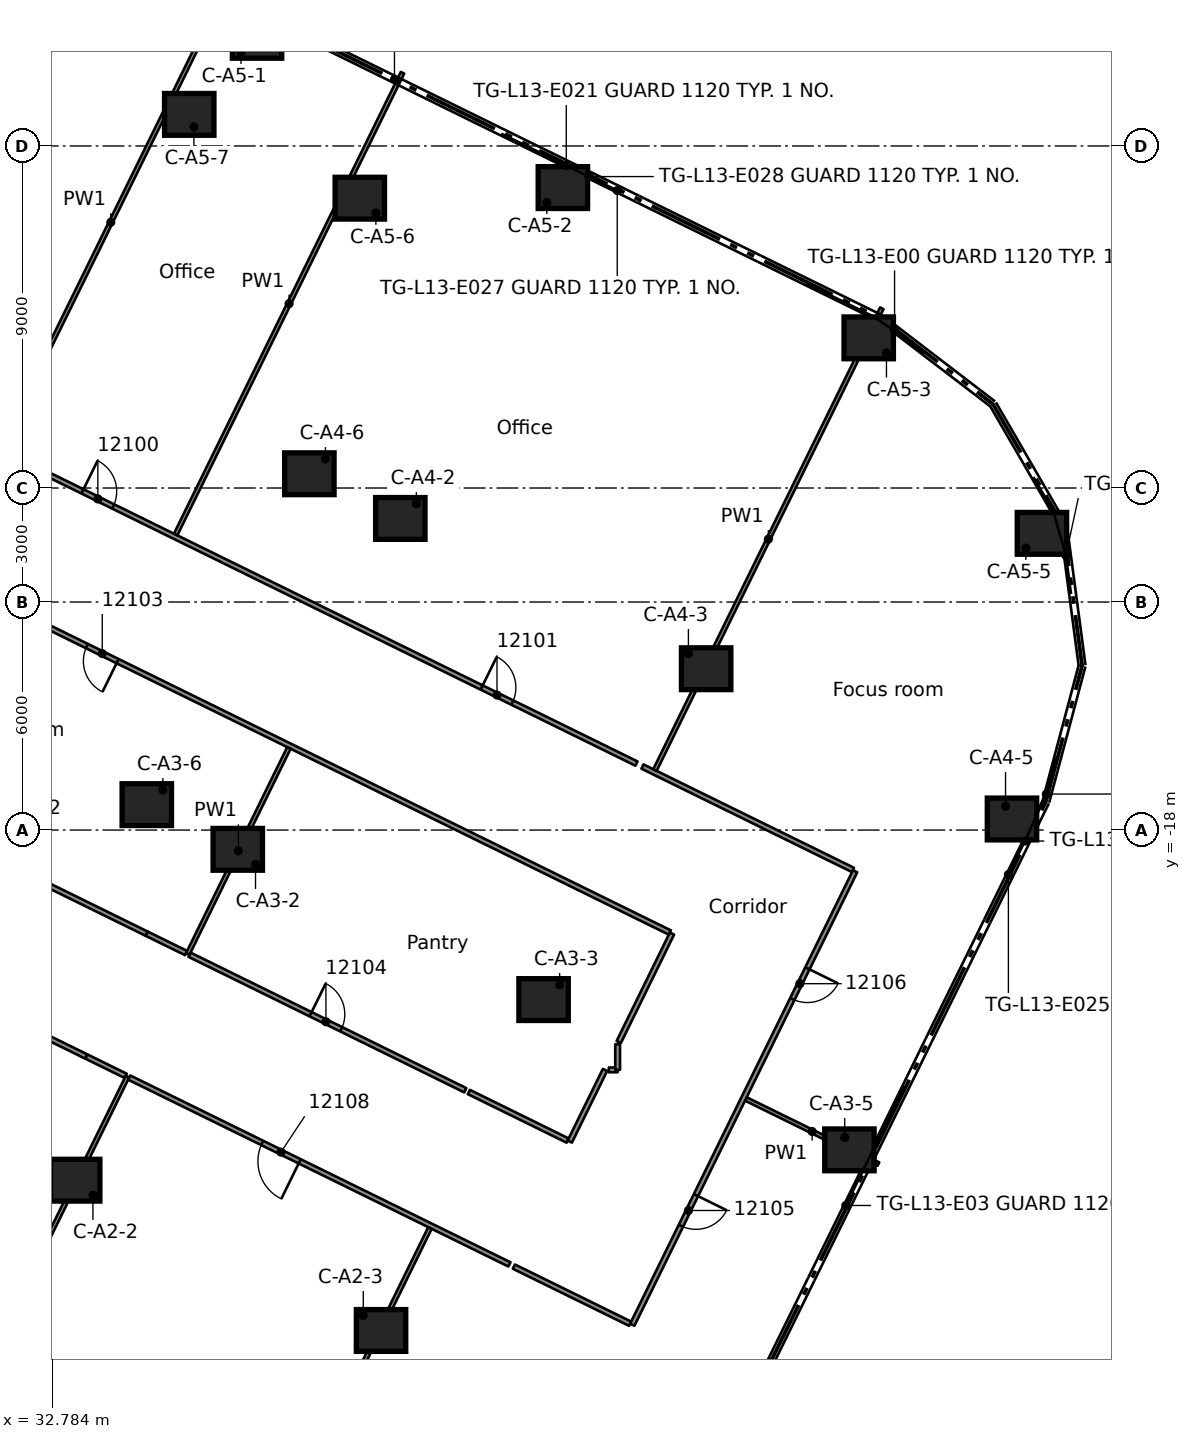
"""IFC4 building model, lengths in metres.
Left out: names, types, materials, properties, quantities, classifications, styles, units other than length and angle.
Written with IfcOpenShell. Run it as: python <this file> out.ifc"""

import sys

from ifc_helpers import new_model, si_unit, direction, frame, frame_2d, origin, origin_2d, place, context, subcontext, project, spatial, rectangle, extrude, element, fill, save


model = new_model("IFC4")
c1 = context("Model", 3, precision=1e-05, world=origin(), true_north=direction((0.0, 1.0)))
c2 = subcontext(c1, "Body", "Model", "MODEL_VIEW")
j1 = project(units=[si_unit("LENGTHUNIT", "METRE"), si_unit("PLANEANGLEUNIT", "RADIAN")], contexts=[c1])
p1 = place(None, origin())
s1 = spatial("IfcSite", under=j1, at=p1, CompositionType="ELEMENT")
p2 = place(p1, origin())
s2 = spatial("IfcBuilding", under=s1, at=p2, CompositionType="ELEMENT")
p3 = place(p2, frame((0.0, 0.0, 58.8)))
s3 = spatial("IfcBuildingStorey", under=s2, at=p3, CompositionType="ELEMENT", Elevation=58.8)
for number, where, z_axis, x_axis in (
    (1, (33.388, -27.213, 0.0), (0.0, 0.0, 1.0), (1.0, 0.0, 0.0)),
    (2, (41.436, -31.167, 0.0), (0.0, 0.0, 1.0), (1.0, 0.0, 0.0)),
    (3, (37.666, -18.507, 0.0), (0.0, 0.0, 1.0), (1.0, 0.0, 0.0)),
    (4, (45.713, -22.461, 0.0), (0.0, 0.0, 1.0), (1.0, 0.0, 0.0)),
    (5, (53.761, -26.415, 0.0), (0.0, 0.0, 1.0), (1.0, 0.0, 0.0)),
    (6, (35.272, -17.331, 0.0), (0.0, 0.0, 1.0), (1.0, 0.0, 0.0)),
    (7, (41.943, -9.801, 0.0), (0.0, 0.0, 1.0), (1.0, 0.0, 0.0)),
    (8, (49.991, -13.755, 0.0), (0.0, 0.0, 1.0), (1.0, 0.0, 0.0)),
    (9, (58.039, -17.709, 0.0), (0.0, 0.0, 1.0), (1.0, 0.0, 0.0)),
    (10, (39.55, -8.625, 0.0), (0.0, 0.0, 1.0), (1.0, 0.0, 0.0)),
    (11, (38.173, 2.859, 0.0), (0.0, 0.0, 1.0), (1.0, 0.0, 0.0)),
    (12, (46.221, -1.095, 0.0), (0.0, 0.0, 1.0), (1.0, 0.0, 0.0)),
    (13, (54.269, -5.049, 0.0), (0.0, 0.0, 1.0), (1.0, 0.0, 0.0)),
    (14, (58.827, -10.193, 0.0), (0.0, 0.0, 1.0), (1.0, 0.0, 0.0)),
    (15, (40.877, -1.374, 0.0), (0.0, 0.0, 1.0), (1.0, 0.0, 0.0)),
    (16, (36.389, 0.831, 0.0), (0.0, 0.0, 1.0), (1.0, 0.0, 0.0)),
):
    element("IfcColumn", number, at=place(p3, frame(where, z_axis=z_axis, x_axis=x_axis)), inside=s3, PredefinedType="COLUMN", context=c2, shape_type="SweptSolid", body=[
        extrude(rectangle(XDim=1.3, YDim=1.1, at=origin_2d()), origin(), (0.0, 0.0, 1.0), 3.5),
    ])
p4 = place(p3, frame((33.681, -23.959, 0.0), z_axis=(0.0, 0.0, 1.0), x_axis=(-0.897502075903, 0.44101023089, 0.0)))
e17 = element("IfcWall", 17, at=p4, inside=s3, PredefinedType="PARTITIONING", context=c2, shape_type="SweptSolid", body=[
    extrude(rectangle(XDim=9.052, YDim=0.125, at=frame_2d((4.526, 0.0))), origin(), (0.0, 0.0, 1.0), 3.08),
])
p5 = place(p4, frame((3.35, 0.0, 0.0)))
e18 = element("IfcOpeningElement", 18, at=p5, cuts=e17, PredefinedType="OPENING", context=c2, shape_type="SweptSolid", body=[
    extrude(rectangle(XDim=1.8, YDim=2.1, at=frame_2d((0.9, 1.05))), frame((0.0, 0.073, 0.0), z_axis=(0.0, -1.0, 0.0), x_axis=(1.0, 0.0, 0.0)), (0.0, 0.0, 1.0), 0.145),
])
p6 = place(p3, frame((44.815, -29.429, 0.0), z_axis=(0.0, 0.0, 1.0), x_axis=(-0.8975062817, 0.441001671549, 0.0)))
e19 = element("IfcWall", 19, at=p6, inside=s3, PredefinedType="PARTITIONING", context=c2, shape_type="SweptSolid", body=[
    extrude(rectangle(XDim=11.15, YDim=0.125, at=frame_2d((5.575, 0.0))), origin(), (0.0, 0.0, 1.0), 3.08),
])
p7 = place(p6, frame((6.149, 0.0, 0.0)))
e20 = element("IfcOpeningElement", 20, at=p7, cuts=e19, PredefinedType="OPENING", context=c2, shape_type="SweptSolid", body=[
    extrude(rectangle(XDim=1.1, YDim=2.1, at=frame_2d((0.55, 1.05))), frame((0.0, 0.073, 0.0), z_axis=(0.0, -1.0, 0.0), x_axis=(1.0, 0.0, 0.0)), (0.0, 0.0, 1.0), 0.145),
])
p8 = place(p3, frame((44.932, -29.487, 0.0), z_axis=(0.0, 0.0, 1.0), x_axis=(0.897586164131, -0.440839061291, 0.0)))
e21 = element("IfcWall", 21, at=p8, inside=s3, PredefinedType="PARTITIONING", context=c2, shape_type="SweptSolid", body=[
    extrude(rectangle(XDim=3.407, YDim=0.125, at=frame_2d((1.704, 0.0))), origin(), (0.0, 0.0, 1.0), 3.08),
])
p9 = place(p3, frame((27.304, -16.813, 0.0), z_axis=(0.0, 0.0, 1.0), x_axis=(0.897492436915, -0.441029846701, 0.0)))
e22 = element("IfcWall", 22, at=p9, inside=s3, PredefinedType="PARTITIONING", context=c2, shape_type="SweptSolid", body=[
    extrude(rectangle(XDim=8.875, YDim=0.125, at=frame_2d((4.438, 0.0))), origin(), (0.0, 0.0, 1.0), 3.08),
])
p10 = place(p9, frame((4.1, 0.0, 0.0)))
e23 = element("IfcOpeningElement", 23, at=p10, cuts=e22, PredefinedType="OPENING", context=c2, shape_type="SweptSolid", body=[
    extrude(rectangle(XDim=0.9, YDim=2.1, at=frame_2d((0.45, 1.05))), frame((0.0, 0.073, 0.0), z_axis=(0.0, -1.0, 0.0), x_axis=(1.0, 0.0, 0.0)), (0.0, 0.0, 1.0), 0.145),
])
p11 = place(p3, frame((36.396, -21.28, 0.0), z_axis=(0.0, 0.0, 1.0), x_axis=(0.897479279636, -0.441056620656, 0.0)))
e24 = element("IfcWall", 24, at=p11, inside=s3, PredefinedType="PARTITIONING", context=c2, shape_type="SweptSolid", body=[
    extrude(rectangle(XDim=8.087, YDim=0.125, at=frame_2d((4.043, 0.0))), origin(), (0.0, 0.0, 1.0), 3.08),
])
p12 = place(p11, frame((3.55, 0.0, 0.0)))
e25 = element("IfcOpeningElement", 25, at=p12, cuts=e24, PredefinedType="OPENING", context=c2, shape_type="SweptSolid", body=[
    extrude(rectangle(XDim=0.9, YDim=2.1, at=frame_2d((0.45, 1.05))), frame((0.0, 0.073, 0.0), z_axis=(0.0, -1.0, 0.0), x_axis=(1.0, 0.0, 0.0)), (0.0, 0.0, 1.0), 0.145),
])
p13 = place(p3, frame((43.747, -24.892, 0.0), z_axis=(0.0, 0.0, 1.0), x_axis=(0.897391556566, -0.441235078165, 0.0)))
e26 = element("IfcWall", 26, at=p13, inside=s3, PredefinedType="PARTITIONING", context=c2, shape_type="SweptSolid", body=[
    extrude(rectangle(XDim=2.896, YDim=0.125, at=frame_2d((1.448, 0.0))), origin(), (0.0, 0.0, 1.0), 3.08),
])
p14 = place(p3, frame((51.036, -25.076, 0.0), z_axis=(0.0, 0.0, 1.0), x_axis=(0.897583548385, -0.440844387136, 0.0)))
e27 = element("IfcWall", 27, at=p14, inside=s3, PredefinedType="PARTITIONING", context=c2, shape_type="SweptSolid", body=[
    extrude(rectangle(XDim=3.886, YDim=0.1, at=frame_2d((1.943, 0.0))), origin(), (0.0, 0.0, 1.0), 3.08),
])
p15 = place(p3, frame((49.036, -20.696, 0.0), z_axis=(0.0, 0.0, 1.0), x_axis=(-0.897509654304, 0.440994807715, 0.0)))
e28 = element("IfcWall", 28, at=p15, inside=s3, PredefinedType="PARTITIONING", context=c2, shape_type="SweptSolid", body=[
    extrude(rectangle(XDim=20.985, YDim=0.125, at=frame_2d((10.492, 0.0))), origin(), (0.0, 0.0, 1.0), 3.08),
])
p16 = place(p15, frame((16.192, 0.0, 0.0)))
e29 = element("IfcOpeningElement", 29, at=p16, cuts=e28, PredefinedType="OPENING", context=c2, shape_type="SweptSolid", body=[
    extrude(rectangle(XDim=0.9, YDim=2.1, at=frame_2d((0.45, 1.05))), frame((0.0, 0.073, 0.0), z_axis=(0.0, -1.0, 0.0), x_axis=(1.0, 0.0, 0.0)), (0.0, 0.0, 1.0), 0.145),
])
p17 = place(p3, frame((32.2, -8.411, 0.0), z_axis=(0.0, 0.0, 1.0), x_axis=(0.897530587373, -0.440952202318, 0.0)))
e30 = element("IfcWall", 30, at=p17, inside=s3, PredefinedType="PARTITIONING", context=c2, shape_type="SweptSolid", body=[
    extrude(rectangle(XDim=17.78, YDim=0.125, at=frame_2d((8.89, 0.0))), origin(), (0.0, 0.0, 1.0), 3.08),
])
p18 = place(p17, frame((1.538, 0.0, 0.0)))
e31 = element("IfcOpeningElement", 31, at=p18, cuts=e30, PredefinedType="OPENING", context=c2, shape_type="SweptSolid", body=[
    extrude(rectangle(XDim=0.9, YDim=2.1, at=frame_2d((0.45, 1.05))), frame((0.0, 0.073, 0.0), z_axis=(0.0, -1.0, 0.0), x_axis=(1.0, 0.0, 0.0)), (0.0, 0.0, 1.0), 0.145),
])
p19 = place(p17, frame((13.24, 0.0, 0.0)))
e32 = element("IfcOpeningElement", 32, at=p19, cuts=e30, PredefinedType="OPENING", context=c2, shape_type="SweptSolid", body=[
    extrude(rectangle(XDim=0.9, YDim=2.1, at=frame_2d((0.45, 1.05))), frame((0.0, 0.073, 0.0), z_axis=(0.0, -1.0, 0.0), x_axis=(1.0, 0.0, 0.0)), (0.0, 0.0, 1.0), 0.145),
])
p20 = place(p3, frame((53.854, -19.049, 0.0), z_axis=(0.0, 0.0, 1.0), x_axis=(-0.897616669458, 0.440776944395, 0.0)))
e33 = element("IfcWall", 33, at=p20, inside=s3, PredefinedType="PARTITIONING", context=c2, shape_type="SweptSolid", body=[
    extrude(rectangle(XDim=6.171, YDim=0.125, at=frame_2d((3.085, 0.0))), origin(), (0.0, 0.0, 1.0), 3.08),
])
p21 = place(p3, frame((33.681, -23.959, 0.0), z_axis=(0.0, 0.0, 1.0), x_axis=(0.897699526178, -0.440608171394, 0.0)))
e34 = element("IfcWall", 34, at=p21, inside=s3, PredefinedType="PARTITIONING", context=c2, shape_type="SweptSolid", body=[
    extrude(rectangle(XDim=1.155, YDim=0.125, at=frame_2d((0.578, 0.0))), origin(), (0.0, 0.0, 1.0), 3.08),
])
p22 = place(p3, frame((35.269, -20.727, 0.0), z_axis=(0.0, 0.0, 1.0), x_axis=(0.897658489219, -0.440691770667, 0.0)))
e35 = element("IfcWall", 35, at=p22, inside=s3, PredefinedType="PARTITIONING", context=c2, shape_type="SweptSolid", body=[
    extrude(rectangle(XDim=1.155, YDim=0.125, at=frame_2d((0.578, 0.0))), origin(), (0.0, 0.0, 1.0), 3.08),
])
p23 = place(p3, frame((47.43, -24.31, 0.0), z_axis=(0.0, 0.0, 1.0), x_axis=(1.0, 0.0, 0.0)))
e36 = element("IfcWall", 36, at=p23, inside=s3, PredefinedType="PARTITIONING", context=c2, shape_type="SweptSolid", body=[
    extrude(rectangle(XDim=0.232, YDim=0.125, at=frame_2d((0.116, 0.0))), origin(), (0.0, 0.0, 1.0), 3.08),
])
p24 = place(p3, frame((53.911, -19.084, 0.0), z_axis=(0.0, 0.0, 1.0), x_axis=(-0.441018582797, -0.897497971935, 0.0)))
e37 = element("IfcWall", 37, at=p24, inside=s3, PredefinedType="PARTITIONING", context=c2, shape_type="SweptSolid", body=[
    extrude(rectangle(XDim=13.296, YDim=0.125, at=frame_2d((6.648, 0.0))), origin(), (0.0, 0.0, 1.0), 3.08),
])
p25 = place(p24, frame((9.495, 0.0, 0.0)))
e38 = element("IfcOpeningElement", 38, at=p25, cuts=e37, PredefinedType="OPENING", context=c2, shape_type="SweptSolid", body=[
    extrude(rectangle(XDim=0.9, YDim=2.1, at=frame_2d((0.45, 1.05))), frame((0.0, 0.073, 0.0), z_axis=(0.0, -1.0, 0.0), x_axis=(1.0, 0.0, 0.0)), (0.0, 0.0, 1.0), 0.145),
])
p26 = place(p24, frame((2.846, 0.0, 0.0)))
e39 = element("IfcOpeningElement", 39, at=p26, cuts=e37, PredefinedType="OPENING", context=c2, shape_type="SweptSolid", body=[
    extrude(rectangle(XDim=0.9, YDim=2.1, at=frame_2d((0.45, 1.05))), frame((0.0, 0.073, 0.0), z_axis=(0.0, -1.0, 0.0), x_axis=(1.0, 0.0, 0.0)), (0.0, 0.0, 1.0), 0.145),
])
p27 = place(p3, frame((46.403, -26.197, 0.0), z_axis=(0.0, 0.0, 1.0), x_axis=(0.440925238095, 0.897543834256, 0.0)))
e40 = element("IfcWall", 40, at=p27, inside=s3, PredefinedType="PARTITIONING", context=c2, shape_type="SweptSolid", body=[
    extrude(rectangle(XDim=2.1, YDim=0.125, at=frame_2d((1.05, 0.0))), origin(), (0.0, 0.0, 1.0), 3.08),
])
p28 = place(p3, frame((47.691, -23.577, 0.0), z_axis=(0.0, 0.0, 1.0), x_axis=(0.440690066064, 0.897659326066, 0.0)))
e41 = element("IfcWall", 41, at=p28, inside=s3, PredefinedType="PARTITIONING", context=c2, shape_type="SweptSolid", body=[
    extrude(rectangle(XDim=3.179, YDim=0.125, at=frame_2d((1.59, 0.0))), origin(), (0.0, 0.0, 1.0), 3.08),
])
p29 = place(p3, frame((36.754, -40.62, 0.0), z_axis=(0.0, 0.0, 1.0), x_axis=(0.440962253121, 0.897525649395, 0.0)))
e42 = element("IfcWall", 42, at=p29, inside=s3, PredefinedType="PARTITIONING", context=c2, shape_type="SweptSolid", body=[
    extrude(rectangle(XDim=13.536, YDim=0.1, at=frame_2d((6.768, 0.0))), origin(), (0.0, 0.0, 1.0), 3.08),
])
p30 = place(p3, frame((48.644, -16.421, 0.0), z_axis=(0.0, 0.0, 1.0), x_axis=(0.440940839441, 0.897536169808, 0.0)))
e43 = element("IfcWall", 43, at=p30, inside=s3, PredefinedType="PARTITIONING", context=c2, shape_type="SweptSolid", body=[
    extrude(rectangle(XDim=13.537, YDim=0.1, at=frame_2d((6.769, 0.0))), origin(), (0.0, 0.0, 1.0), 3.08),
])
p31 = place(p3, frame((28.766, -36.695, 0.0), z_axis=(0.0, 0.0, 1.0), x_axis=(0.440983805809, 0.897515060049, 0.0)))
e44 = element("IfcWall", 44, at=p31, inside=s3, PredefinedType="PARTITIONING", context=c2, shape_type="SweptSolid", body=[
    extrude(rectangle(XDim=13.599, YDim=0.1, at=frame_2d((6.799, 0.0))), origin(), (0.0, 0.0, 1.0), 3.08),
])
p32 = place(p3, frame((36.351, -21.258, 0.0), z_axis=(0.0, 0.0, 1.0), x_axis=(0.440827848832, 0.897591670914, 0.0)))
e45 = element("IfcWall", 45, at=p32, inside=s3, PredefinedType="PARTITIONING", context=c2, shape_type="SweptSolid", body=[
    extrude(rectangle(XDim=6.036, YDim=0.1, at=frame_2d((3.018, 0.0))), origin(), (0.0, 0.0, 1.0), 3.08),
])
p33 = place(p3, frame((36.031, -10.223, 0.0), z_axis=(0.0, 0.0, 1.0), x_axis=(0.44102750491, 0.897493587672, 0.0)))
e46 = element("IfcWall", 46, at=p33, inside=s3, PredefinedType="PARTITIONING", context=c2, shape_type="SweptSolid", body=[
    extrude(rectangle(XDim=13.537, YDim=0.1, at=frame_2d((6.768, 0.0))), origin(), (0.0, 0.0, 1.0), 3.08),
])
p34 = place(p3, frame((31.275, -8.217, 0.0), z_axis=(0.0, 0.0, 1.0), x_axis=(0.440962245693, 0.897525653045, 0.0)))
e47 = element("IfcWall", 47, at=p34, inside=s3, PredefinedType="PARTITIONING", context=c2, shape_type="SweptSolid", body=[
    extrude(rectangle(XDim=13.833, YDim=0.1, at=frame_2d((6.917, 0.0))), origin(), (0.0, 0.0, 1.0), 3.08),
])
p35 = place(p3, frame((47.662, -24.31, 0.0), z_axis=(0.0, 0.0, 1.0), x_axis=(0.0, 1.0, 0.0)))
e48 = element("IfcWall", 48, at=p35, inside=s3, PredefinedType="PARTITIONING", context=c2, shape_type="SweptSolid", body=[
    extrude(rectangle(XDim=0.676, YDim=0.125, at=frame_2d((0.338, 0.0))), origin(), (0.0, 0.0, 1.0), 3.08),
])
p36 = place(p18, origin())
e49 = element("IfcDoor", 49, at=p36, inside=s3, OperationType="SINGLE_SWING_LEFT", PredefinedType="DOOR", context=c2, shape_type="SweptSolid", body=[
    extrude(rectangle(XDim=0.9, YDim=2.1, at=frame_2d((0.45, 1.05))), frame((0.0, 0.025, 0.0), z_axis=(0.0, -1.0, 0.0), x_axis=(1.0, 0.0, 0.0)), (0.0, 0.0, 1.0), 0.05),
])
fill(e31, e49)
p37 = place(p19, origin())
e50 = element("IfcDoor", 50, at=p37, inside=s3, OperationType="SINGLE_SWING_RIGHT", PredefinedType="DOOR", context=c2, shape_type="SweptSolid", body=[
    extrude(rectangle(XDim=0.9, YDim=2.1, at=frame_2d((0.45, 1.05))), frame((0.0, 0.025, 0.0), z_axis=(0.0, -1.0, 0.0), x_axis=(1.0, 0.0, 0.0)), (0.0, 0.0, 1.0), 0.05),
])
fill(e32, e50)
p38 = place(p16, origin())
e51 = element("IfcDoor", 51, at=p38, inside=s3, OperationType="SINGLE_SWING_RIGHT", PredefinedType="DOOR", context=c2, shape_type="SweptSolid", body=[
    extrude(rectangle(XDim=0.9, YDim=2.1, at=frame_2d((0.45, 1.05))), frame((0.0, 0.025, 0.0), z_axis=(0.0, -1.0, 0.0), x_axis=(1.0, 0.0, 0.0)), (0.0, 0.0, 1.0), 0.05),
])
fill(e29, e51)
p39 = place(p12, origin())
e52 = element("IfcDoor", 52, at=p39, inside=s3, OperationType="SINGLE_SWING_LEFT", PredefinedType="DOOR", context=c2, shape_type="SweptSolid", body=[
    extrude(rectangle(XDim=0.9, YDim=2.1, at=frame_2d((0.45, 1.05))), frame((0.0, 0.025, 0.0), z_axis=(0.0, -1.0, 0.0), x_axis=(1.0, 0.0, 0.0)), (0.0, 0.0, 1.0), 0.05),
])
fill(e25, e52)
p40 = place(p25, origin())
e53 = element("IfcDoor", 53, at=p40, inside=s3, OperationType="SINGLE_SWING_RIGHT", PredefinedType="DOOR", context=c2, shape_type="SweptSolid", body=[
    extrude(rectangle(XDim=0.9, YDim=2.1, at=frame_2d((0.45, 1.05))), frame((0.0, 0.025, 0.0), z_axis=(0.0, -1.0, 0.0), x_axis=(1.0, 0.0, 0.0)), (0.0, 0.0, 1.0), 0.05),
])
fill(e38, e53)
p41 = place(p26, origin())
e54 = element("IfcDoor", 54, at=p41, inside=s3, OperationType="SINGLE_SWING_LEFT", PredefinedType="DOOR", context=c2, shape_type="SweptSolid", body=[
    extrude(rectangle(XDim=0.9, YDim=2.1, at=frame_2d((0.45, 1.05))), frame((0.0, 0.025, 0.0), z_axis=(0.0, -1.0, 0.0), x_axis=(1.0, 0.0, 0.0)), (0.0, 0.0, 1.0), 0.05),
])
fill(e39, e54)
p42 = place(p7, origin())
e55 = element("IfcDoor", 55, at=p42, inside=s3, OperationType="SINGLE_SWING_RIGHT", PredefinedType="DOOR", context=c2, shape_type="SweptSolid", body=[
    extrude(rectangle(XDim=1.1, YDim=2.1, at=frame_2d((0.55, 1.05))), frame((0.0, 0.025, 0.0), z_axis=(0.0, -1.0, 0.0), x_axis=(1.0, 0.0, 0.0)), (0.0, 0.0, 1.0), 0.05),
])
fill(e20, e55)
save(model, sys.argv[1])
